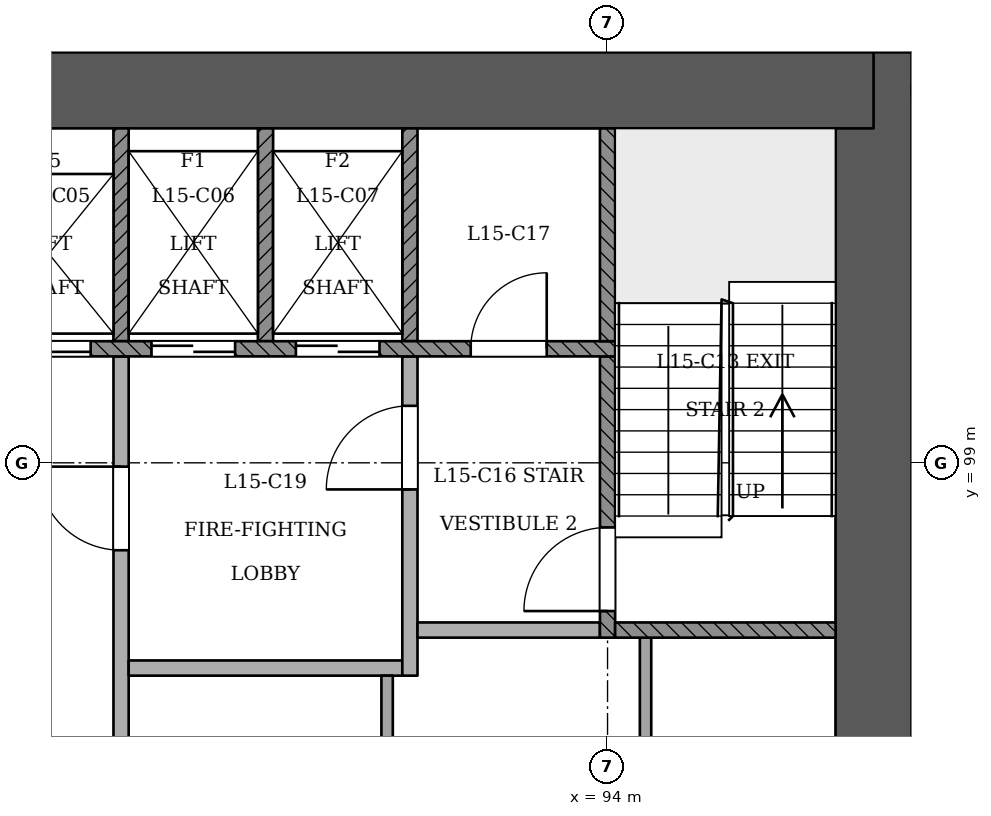
"""IFC4 building model, lengths in metres.
Left out: names, types, materials, properties, quantities, classifications, styles, units other than length and angle.
Written with IfcOpenShell. Run it as: python <this file> out.ifc"""

import sys

from ifc_helpers import new_model, si_unit, direction, frame, frame_2d, origin, place, context, subcontext, project, spatial, rectangle, extrude, element, fill, save


model = new_model("IFC4")
c1 = context("Model", 3, precision=1e-05, world=origin(), true_north=direction((0.0, 1.0)))
c2 = subcontext(c1, "Body", "Model", "MODEL_VIEW")
j1 = project(units=[si_unit("LENGTHUNIT", "METRE"), si_unit("PLANEANGLEUNIT", "RADIAN")], contexts=[c1])
p1 = place(None, origin())
s1 = spatial("IfcSite", under=j1, at=p1, CompositionType="ELEMENT")
p2 = place(p1, origin())
s2 = spatial("IfcBuilding", under=s1, at=p2, CompositionType="ELEMENT")
p3 = place(p2, frame((0.0, 0.0, 63.0)))
s3 = spatial("IfcBuildingStorey", under=s2, at=p3, CompositionType="ELEMENT", Elevation=63.0)
p4 = place(p3, frame((97.5, 92.9, 0.0), z_axis=(0.0, 0.0, 1.0), x_axis=(0.0, 1.0, 0.0)))
e1 = element("IfcWall", 1, at=p4, inside=s3, PredefinedType="SHEAR", context=c2, shape_type="SweptSolid", body=[
    extrude(rectangle(XDim=11.5, YDim=1.0, at=frame_2d((5.75, 0.0))), origin(), (0.0, 0.0, 1.0), 3.6),
])
p5 = place(p3, frame((97.5, 103.9, 0.0), z_axis=(0.0, 0.0, 1.0), x_axis=(-1.0, 0.0, 0.0)))
e2 = element("IfcWall", 2, at=p5, inside=s3, PredefinedType="SHEAR", context=c2, shape_type="SweptSolid", body=[
    extrude(rectangle(XDim=25.5, YDim=1.0, at=frame_2d((12.75, 0.0))), origin(), (0.0, 0.0, 1.0), 3.6),
])
p6 = place(p3, frame((85.862, 59.265, 0.0), z_axis=(0.0, 0.0, 1.0), x_axis=(0.500001772576, 0.866024380385, 0.0)))
e3 = element("IfcWall", 3, at=p6, inside=s3, PredefinedType="PARTITIONING", context=c2, shape_type="SweptSolid", body=[
    extrude(rectangle(XDim=43.58, YDim=0.15, at=frame_2d((21.79, 0.0))), origin(), (0.0, 0.0, 1.0), 2.7),
])
p7 = place(p6, frame((3.55, 0.0, 0.0)))
e4 = element("IfcOpeningElement", 4, at=p7, cuts=e3, PredefinedType="OPENING", context=c2, shape_type="SweptSolid", body=[
    extrude(rectangle(XDim=1.2, YDim=2.1, at=frame_2d((0.6, 1.05))), frame((0.0, 0.085, 0.0), z_axis=(0.0, -1.0, 0.0), x_axis=(1.0, 0.0, 0.0)), (0.0, 0.0, 1.0), 0.171),
])
p8 = place(p6, frame((14.44, 0.0, 0.0)))
e5 = element("IfcOpeningElement", 5, at=p8, cuts=e3, PredefinedType="OPENING", context=c2, shape_type="SweptSolid", body=[
    extrude(rectangle(XDim=1.2, YDim=2.1, at=frame_2d((0.6, 1.05))), frame((0.0, 0.085, 0.0), z_axis=(0.0, -1.0, 0.0), x_axis=(1.0, 0.0, 0.0)), (0.0, 0.0, 1.0), 0.171),
])
p9 = place(p6, frame((27.94, 0.0, 0.0)))
e6 = element("IfcOpeningElement", 6, at=p9, cuts=e3, PredefinedType="OPENING", context=c2, shape_type="SweptSolid", body=[
    extrude(rectangle(XDim=1.2, YDim=2.1, at=frame_2d((0.6, 1.05))), frame((0.0, 0.085, 0.0), z_axis=(0.0, -1.0, 0.0), x_axis=(1.0, 0.0, 0.0)), (0.0, 0.0, 1.0), 0.171),
])
p10 = place(p6, frame((38.831, 0.0, 0.0)))
e7 = element("IfcOpeningElement", 7, at=p10, cuts=e3, PredefinedType="OPENING", context=c2, shape_type="SweptSolid", body=[
    extrude(rectangle(XDim=1.2, YDim=2.1, at=frame_2d((0.6, 1.05))), frame((0.0, 0.085, 0.0), z_axis=(0.0, -1.0, 0.0), x_axis=(1.0, 0.0, 0.0)), (0.0, 0.0, 1.0), 0.171),
])
p11 = place(p3, frame((87.6, 93.4, 0.0), z_axis=(0.0, 0.0, 1.0), x_axis=(0.0, 1.0, 0.0)))
e8 = element("IfcWall", 8, at=p11, inside=s3, PredefinedType="PARTITIONING", context=c2, shape_type="SweptSolid", body=[
    extrude(rectangle(XDim=7.0, YDim=0.2, at=frame_2d((3.5, 0.0))), origin(), (0.0, 0.0, 1.0), 3.1),
])
p12 = place(p11, frame((4.45, 0.0, 0.0)))
e9 = element("IfcOpeningElement", 9, at=p12, cuts=e8, PredefinedType="OPENING", context=c2, shape_type="SweptSolid", body=[
    extrude(rectangle(XDim=1.1, YDim=2.1, at=frame_2d((0.55, 1.05))), frame((0.0, 0.11, 0.0), z_axis=(0.0, -1.0, 0.0), x_axis=(1.0, 0.0, 0.0)), (0.0, 0.0, 1.0), 0.221),
])
p13 = place(p3, frame((91.1, 93.4, 0.0), z_axis=(0.0, 0.0, 1.0), x_axis=(0.0, 1.0, 0.0)))
e10 = element("IfcWall", 10, at=p13, inside=s3, PredefinedType="PARTITIONING", context=c2, shape_type="SweptSolid", body=[
    extrude(rectangle(XDim=2.8, YDim=0.15, at=frame_2d((1.4, 0.0))), origin(), (0.0, 0.0, 1.0), 3.1),
])
p14 = place(p3, frame((94.5, 93.4, 0.0), z_axis=(0.0, 0.0, 1.0), x_axis=(0.0, 1.0, 0.0)))
e11 = element("IfcWall", 11, at=p14, inside=s3, PredefinedType="PARTITIONING", context=c2, shape_type="SweptSolid", body=[
    extrude(rectangle(XDim=3.3, YDim=0.15, at=frame_2d((1.65, 0.0))), origin(), (0.0, 0.0, 1.0), 3.1),
])
p15 = place(p3, frame((87.7, 96.3, 0.0), z_axis=(0.0, 0.0, 1.0), x_axis=(1.0, 0.0, 0.0)))
e12 = element("IfcWall", 12, at=p15, inside=s3, PredefinedType="PARTITIONING", context=c2, shape_type="SweptSolid", body=[
    extrude(rectangle(XDim=3.6, YDim=0.2, at=frame_2d((1.8, 0.0))), origin(), (0.0, 0.0, 1.0), 3.1),
])
p16 = place(p3, frame((91.4, 96.2, 0.0), z_axis=(0.0, 0.0, 1.0), x_axis=(0.0, 1.0, 0.0)))
e13 = element("IfcWall", 13, at=p16, inside=s3, PredefinedType="PARTITIONING", context=c2, shape_type="SweptSolid", body=[
    extrude(rectangle(XDim=4.2, YDim=0.2, at=frame_2d((2.1, 0.0))), origin(), (0.0, 0.0, 1.0), 3.1),
])
p17 = place(p16, frame((2.45, 0.0, 0.0)))
e14 = element("IfcOpeningElement", 14, at=p17, cuts=e13, PredefinedType="OPENING", context=c2, shape_type="SweptSolid", body=[
    extrude(rectangle(XDim=1.1, YDim=2.1, at=frame_2d((0.55, 1.05))), frame((0.0, 0.11, 0.0), z_axis=(0.0, -1.0, 0.0), x_axis=(1.0, 0.0, 0.0)), (0.0, 0.0, 1.0), 0.221),
])
p18 = place(p3, frame((91.5, 96.8, 0.0), z_axis=(0.0, 0.0, 1.0), x_axis=(1.0, 0.0, 0.0)))
e15 = element("IfcWall", 15, at=p18, inside=s3, PredefinedType="PARTITIONING", context=c2, shape_type="SweptSolid", body=[
    extrude(rectangle(XDim=2.4, YDim=0.2, at=frame_2d((1.2, 0.0))), origin(), (0.0, 0.0, 1.0), 3.1),
])
p19 = place(p3, frame((94.0, 96.7, 0.0), z_axis=(0.0, 0.0, 1.0), x_axis=(0.0, 1.0, 0.0)))
e16 = element("IfcWall", 16, at=p19, inside=s3, PredefinedType="SOLIDWALL", context=c2, shape_type="SweptSolid", body=[
    extrude(rectangle(XDim=3.7, YDim=0.2, at=frame_2d((1.85, 0.0))), origin(), (0.0, 0.0, 1.0), 3.1),
])
p20 = place(p19, frame((0.35, 0.0, 0.0)))
e17 = element("IfcOpeningElement", 17, at=p20, cuts=e16, PredefinedType="OPENING", context=c2, shape_type="SweptSolid", body=[
    extrude(rectangle(XDim=1.1, YDim=2.1, at=frame_2d((0.55, 1.05))), frame((0.0, 0.11, 0.0), z_axis=(0.0, -1.0, 0.0), x_axis=(1.0, 0.0, 0.0)), (0.0, 0.0, 1.0), 0.221),
])
p21 = place(p3, frame((94.1, 96.8, 0.0), z_axis=(0.0, 0.0, 1.0), x_axis=(1.0, 0.0, 0.0)))
e18 = element("IfcWall", 18, at=p21, inside=s3, PredefinedType="SOLIDWALL", context=c2, shape_type="SweptSolid", body=[
    extrude(rectangle(XDim=2.9, YDim=0.2, at=frame_2d((1.45, 0.0))), origin(), (0.0, 0.0, 1.0), 3.1),
])
p22 = place(p3, frame((75.9, 100.5, 0.0), z_axis=(0.0, 0.0, 1.0), x_axis=(1.0, 0.0, 0.0)))
e19 = element("IfcWall", 19, at=p22, inside=s3, PredefinedType="SOLIDWALL", context=c2, shape_type="SweptSolid", body=[
    extrude(rectangle(XDim=18.2, YDim=0.2, at=frame_2d((9.1, 0.0))), origin(), (0.0, 0.0, 1.0), 3.1),
])
p23 = place(p22, frame((2.6, 0.0, 0.0)))
e20 = element("IfcOpeningElement", 20, at=p23, cuts=e19, PredefinedType="OPENING", context=c2, shape_type="SweptSolid", body=[
    extrude(rectangle(XDim=1.1, YDim=2.1, at=frame_2d((0.55, 1.05))), frame((0.0, 0.11, 0.0), z_axis=(0.0, -1.0, 0.0), x_axis=(1.0, 0.0, 0.0)), (0.0, 0.0, 1.0), 0.221),
])
p24 = place(p22, frame((4.5, 0.0, 0.0)))
e21 = element("IfcOpeningElement", 21, at=p24, cuts=e19, PredefinedType="OPENING", context=c2, shape_type="SweptSolid", body=[
    extrude(rectangle(XDim=1.1, YDim=2.1, at=frame_2d((0.55, 1.05))), frame((0.0, 0.11, 0.0), z_axis=(0.0, -1.0, 0.0), x_axis=(1.0, 0.0, 0.0)), (0.0, 0.0, 1.0), 0.221),
])
p25 = place(p22, frame((6.4, 0.0, 0.0)))
e22 = element("IfcOpeningElement", 22, at=p25, cuts=e19, PredefinedType="OPENING", context=c2, shape_type="SweptSolid", body=[
    extrude(rectangle(XDim=1.1, YDim=2.1, at=frame_2d((0.55, 1.05))), frame((0.0, 0.11, 0.0), z_axis=(0.0, -1.0, 0.0), x_axis=(1.0, 0.0, 0.0)), (0.0, 0.0, 1.0), 0.221),
])
p26 = place(p22, frame((8.3, 0.0, 0.0)))
e23 = element("IfcOpeningElement", 23, at=p26, cuts=e19, PredefinedType="OPENING", context=c2, shape_type="SweptSolid", body=[
    extrude(rectangle(XDim=1.1, YDim=2.1, at=frame_2d((0.55, 1.05))), frame((0.0, 0.11, 0.0), z_axis=(0.0, -1.0, 0.0), x_axis=(1.0, 0.0, 0.0)), (0.0, 0.0, 1.0), 0.221),
])
p27 = place(p22, frame((10.2, 0.0, 0.0)))
e24 = element("IfcOpeningElement", 24, at=p27, cuts=e19, PredefinedType="OPENING", context=c2, shape_type="SweptSolid", body=[
    extrude(rectangle(XDim=1.1, YDim=2.1, at=frame_2d((0.55, 1.05))), frame((0.0, 0.11, 0.0), z_axis=(0.0, -1.0, 0.0), x_axis=(1.0, 0.0, 0.0)), (0.0, 0.0, 1.0), 0.221),
])
p28 = place(p22, frame((12.1, 0.0, 0.0)))
e25 = element("IfcOpeningElement", 25, at=p28, cuts=e19, PredefinedType="OPENING", context=c2, shape_type="SweptSolid", body=[
    extrude(rectangle(XDim=1.1, YDim=2.1, at=frame_2d((0.55, 1.05))), frame((0.0, 0.11, 0.0), z_axis=(0.0, -1.0, 0.0), x_axis=(1.0, 0.0, 0.0)), (0.0, 0.0, 1.0), 0.221),
])
p29 = place(p22, frame((14.0, 0.0, 0.0)))
e26 = element("IfcOpeningElement", 26, at=p29, cuts=e19, PredefinedType="OPENING", context=c2, shape_type="SweptSolid", body=[
    extrude(rectangle(XDim=1.1, YDim=2.1, at=frame_2d((0.55, 1.05))), frame((0.0, 0.11, 0.0), z_axis=(0.0, -1.0, 0.0), x_axis=(1.0, 0.0, 0.0)), (0.0, 0.0, 1.0), 0.221),
])
p30 = place(p22, frame((0.65, 0.0, 0.0)))
e27 = element("IfcOpeningElement", 27, at=p30, cuts=e19, PredefinedType="OPENING", context=c2, shape_type="SweptSolid", body=[
    extrude(rectangle(XDim=1.0, YDim=2.1, at=frame_2d((0.5, 1.05))), frame((0.0, 0.11, 0.0), z_axis=(0.0, -1.0, 0.0), x_axis=(1.0, 0.0, 0.0)), (0.0, 0.0, 1.0), 0.221),
])
p31 = place(p22, frame((16.3, 0.0, 0.0)))
e28 = element("IfcOpeningElement", 28, at=p31, cuts=e19, PredefinedType="OPENING", context=c2, shape_type="SweptSolid", body=[
    extrude(rectangle(XDim=1.0, YDim=2.1, at=frame_2d((0.5, 1.05))), frame((0.0, 0.11, 0.0), z_axis=(0.0, -1.0, 0.0), x_axis=(1.0, 0.0, 0.0)), (0.0, 0.0, 1.0), 0.221),
])
for number, where, z_axis, x_axis in (
    (29, (87.6, 100.6, 0.0), (0.0, 0.0, 1.0), (0.0, 1.0, 0.0)),
    (30, (89.5, 100.6, 0.0), (0.0, 0.0, 1.0), (0.0, 1.0, 0.0)),
    (31, (91.4, 100.6, 0.0), (0.0, 0.0, 1.0), (0.0, 1.0, 0.0)),
    (32, (94.0, 100.6, 0.0), (0.0, 0.0, 1.0), (0.0, 1.0, 0.0)),
):
    element("IfcWall", number, at=place(p3, frame(where, z_axis=z_axis, x_axis=x_axis)), inside=s3, PredefinedType="SOLIDWALL", context=c2, shape_type="SweptSolid", body=[
        extrude(rectangle(XDim=2.8, YDim=0.2, at=frame_2d((1.4, 0.0))), origin(), (0.0, 0.0, 1.0), 3.1),
    ])
p32 = place(p27, origin())
e33 = element("IfcDoor", 33, at=p32, inside=s3, OperationType="SLIDING_TO_RIGHT", PredefinedType="NOTDEFINED", context=c2, shape_type="SweptSolid", body=[
    extrude(rectangle(XDim=1.1, YDim=2.1, at=frame_2d((0.55, 1.05))), frame((0.0, 0.025, 0.0), z_axis=(0.0, -1.0, 0.0), x_axis=(1.0, 0.0, 0.0)), (0.0, 0.0, 1.0), 0.05),
])
fill(e24, e33)
p33 = place(p28, origin())
e34 = element("IfcDoor", 34, at=p33, inside=s3, OperationType="SLIDING_TO_RIGHT", PredefinedType="NOTDEFINED", context=c2, shape_type="SweptSolid", body=[
    extrude(rectangle(XDim=1.1, YDim=2.1, at=frame_2d((0.55, 1.05))), frame((0.0, 0.025, 0.0), z_axis=(0.0, -1.0, 0.0), x_axis=(1.0, 0.0, 0.0)), (0.0, 0.0, 1.0), 0.05),
])
fill(e25, e34)
p34 = place(p29, origin())
e35 = element("IfcDoor", 35, at=p34, inside=s3, OperationType="SLIDING_TO_LEFT", PredefinedType="NOTDEFINED", context=c2, shape_type="SweptSolid", body=[
    extrude(rectangle(XDim=1.1, YDim=2.1, at=frame_2d((0.55, 1.05))), frame((0.0, 0.025, 0.0), z_axis=(0.0, -1.0, 0.0), x_axis=(1.0, 0.0, 0.0)), (0.0, 0.0, 1.0), 0.05),
])
fill(e26, e35)
p35 = place(p20, origin())
e36 = element("IfcDoor", 36, at=p35, inside=s3, OperationType="SINGLE_SWING_LEFT", PredefinedType="NOTDEFINED", context=c2, shape_type="SweptSolid", body=[
    extrude(rectangle(XDim=1.1, YDim=2.1, at=frame_2d((0.55, 1.05))), frame((0.0, 0.025, 0.0), z_axis=(0.0, -1.0, 0.0), x_axis=(1.0, 0.0, 0.0)), (0.0, 0.0, 1.0), 0.05),
])
fill(e17, e36)
p36 = place(p12, origin())
e37 = element("IfcDoor", 37, at=p36, inside=s3, OperationType="SINGLE_SWING_RIGHT", PredefinedType="NOTDEFINED", context=c2, shape_type="SweptSolid", body=[
    extrude(rectangle(XDim=1.1, YDim=2.1, at=frame_2d((0.55, 1.05))), frame((0.0, 0.025, 0.0), z_axis=(0.0, -1.0, 0.0), x_axis=(1.0, 0.0, 0.0)), (0.0, 0.0, 1.0), 0.05),
])
fill(e9, e37)
p37 = place(p17, origin())
e38 = element("IfcDoor", 38, at=p37, inside=s3, OperationType="SINGLE_SWING_LEFT", PredefinedType="NOTDEFINED", context=c2, shape_type="SweptSolid", body=[
    extrude(rectangle(XDim=1.1, YDim=2.1, at=frame_2d((0.55, 1.05))), frame((0.0, 0.025, 0.0), z_axis=(0.0, -1.0, 0.0), x_axis=(1.0, 0.0, 0.0)), (0.0, 0.0, 1.0), 0.05),
])
fill(e14, e38)
p38 = place(p31, origin())
e39 = element("IfcDoor", 39, at=p38, inside=s3, OperationType="SINGLE_SWING_RIGHT", PredefinedType="NOTDEFINED", context=c2, shape_type="SweptSolid", body=[
    extrude(rectangle(XDim=1.0, YDim=2.1, at=frame_2d((0.5, 1.05))), frame((0.0, 0.025, 0.0), z_axis=(0.0, -1.0, 0.0), x_axis=(1.0, 0.0, 0.0)), (0.0, 0.0, 1.0), 0.05),
])
fill(e28, e39)
save(model, sys.argv[1])
